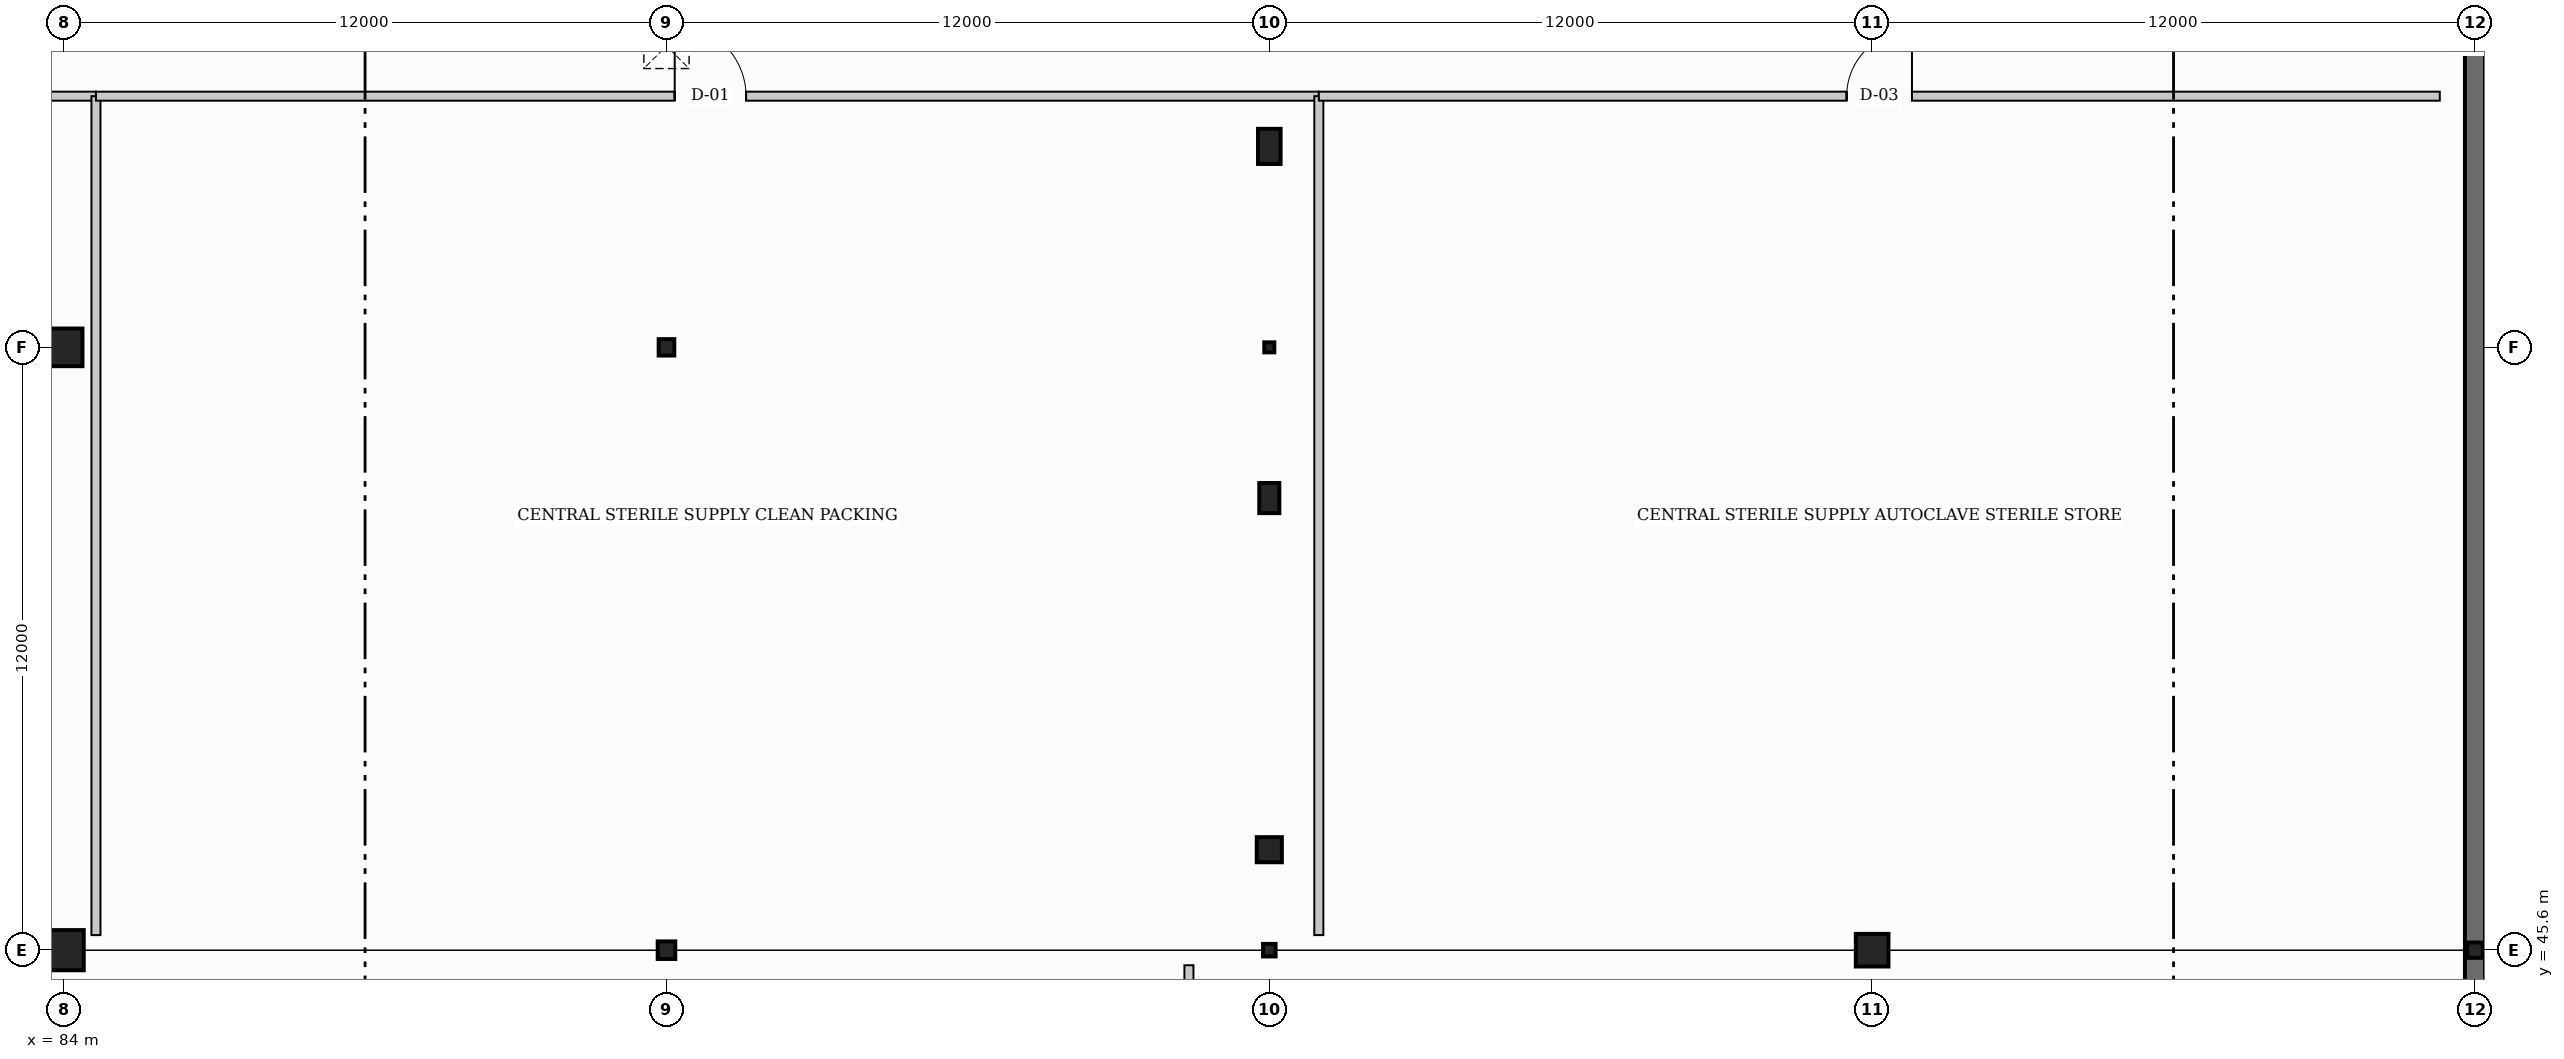
"""IFC4 building model, lengths in metres.
Left out: names, types, materials, properties, quantities, classifications, styles, units other than length and angle.
Written with IfcOpenShell. Run it as: python <this file> out.ifc"""

import sys

from ifc_helpers import new_model, si_unit, direction, frame, frame_2d, origin, origin_2d, place, context, subcontext, project, spatial, rectangle, hollow_rectangle, i_section, extrude, element, fill, save


model = new_model("IFC4")
c1 = context("Model", 3, precision=1e-05, world=origin(), true_north=direction((0.0, 1.0)))
c2 = subcontext(c1, "Body", "Model", "MODEL_VIEW")
j1 = project(units=[si_unit("LENGTHUNIT", "METRE"), si_unit("PLANEANGLEUNIT", "RADIAN")], contexts=[c1])
p1 = place(None, origin())
s1 = spatial("IfcSite", under=j1, at=p1, CompositionType="ELEMENT")
p2 = place(p1, origin())
s2 = spatial("IfcBuilding", under=s1, at=p2, CompositionType="ELEMENT")
p3 = place(p2, frame((0.0, 0.0, -4.8)))
s3 = spatial("IfcBuildingStorey", under=s2, at=p3, CompositionType="ELEMENT", Elevation=-4.8)
p4 = place(p3, frame((132.0, 45.6, 0.0), z_axis=(0.0, 0.0, 1.0), x_axis=(0.0, 1.0, 0.0)))
e1 = element("IfcWall", 1, at=p4, inside=s3, PredefinedType="USERDEFINED", context=c2, shape_type="SweptSolid", body=[
    extrude(rectangle(XDim=36.0, YDim=0.4, at=frame_2d((18.0, 0.0))), origin(), (0.0, 0.0, 1.0), 4.8),
])
p5 = place(p3, frame((132.0, 0.0, 0.0), z_axis=(0.0, 0.0, 1.0), x_axis=(0.0, 1.0, 0.0)))
e2 = element("IfcWall", 2, at=p5, inside=s3, PredefinedType="USERDEFINED", context=c2, shape_type="SweptSolid", body=[
    extrude(rectangle(XDim=45.6, YDim=0.4, at=frame_2d((22.8, 0.0))), origin(), (0.0, 0.0, 1.0), 4.8),
])
p6 = place(p3, frame((84.0, 45.6, 0.0), z_axis=(0.0, 0.0, 1.0), x_axis=(0.0, 1.0, 0.0)))
e3 = element("IfcColumn", 3, at=p6, inside=s3, PredefinedType="COLUMN", context=c2, shape_type="SweptSolid", body=[
    extrude(rectangle(XDim=0.8, YDim=0.8, at=origin_2d()), origin(), (0.0, 0.0, 1.0), 4.8),
])
p7 = place(p3, frame((84.0, 57.6, 0.0), z_axis=(0.0, 0.0, 1.0), x_axis=(0.0, 1.0, 0.0)))
e4 = element("IfcColumn", 4, at=p7, inside=s3, PredefinedType="COLUMN", context=c2, shape_type="SweptSolid", body=[
    extrude(rectangle(XDim=0.75, YDim=0.75, at=origin_2d()), origin(), (0.0, 0.0, 1.0), 4.8),
])
p8 = place(p3, frame((96.0, 45.6, 0.0), z_axis=(0.0, 0.0, 1.0), x_axis=(1.0, 0.0, 0.0)))
e5 = element("IfcColumn", 5, at=p8, inside=s3, PredefinedType="COLUMN", context=c2, shape_type="SweptSolid", body=[
    extrude(i_section(OverallWidth=0.35, OverallDepth=0.35, WebThickness=0.014, FlangeThickness=0.024, at=origin_2d()), origin(), (0.0, 0.0, 1.0), 4.8),
])
p9 = place(p3, frame((96.0, 57.6, 0.0), z_axis=(0.0, 0.0, 1.0), x_axis=(1.0, 0.0, 0.0)))
e6 = element("IfcColumn", 6, at=p9, inside=s3, PredefinedType="COLUMN", context=c2, shape_type="SweptSolid", body=[
    extrude(i_section(OverallWidth=0.311, OverallDepth=0.327, WebThickness=0.016, FlangeThickness=0.025, at=origin_2d()), origin(), (0.0, 0.0, 1.0), 4.8),
])
p10 = place(p3, frame((108.0, 45.6, 0.0), z_axis=(0.0, 0.0, 1.0), x_axis=(0.0, 1.0, 0.0)))
e7 = element("IfcColumn", 7, at=p10, inside=s3, PredefinedType="COLUMN", context=c2, shape_type="SweptSolid", body=[
    extrude(hollow_rectangle(XDim=0.25, YDim=0.25, WallThickness=0.012, at=origin_2d()), origin(), (0.0, 0.0, 1.0), 4.8),
])
p11 = place(p3, frame((108.0, 57.6, 0.0), z_axis=(0.0, 0.0, 1.0), x_axis=(0.0, 1.0, 0.0)))
e8 = element("IfcColumn", 8, at=p11, inside=s3, PredefinedType="COLUMN", context=c2, shape_type="SweptSolid", body=[
    extrude(hollow_rectangle(XDim=0.2, YDim=0.2, WallThickness=0.01, at=origin_2d()), origin(), (0.0, 0.0, 1.0), 4.8),
])
p12 = place(p3, frame((120.0, 45.6, 0.0), z_axis=(0.0, 0.0, 1.0), x_axis=(1.0, 0.0, 0.0)))
e9 = element("IfcColumn", 9, at=p12, inside=s3, PredefinedType="COLUMN", context=c2, shape_type="SweptSolid", body=[
    extrude(rectangle(XDim=0.65, YDim=0.65, at=origin_2d()), origin(), (0.0, 0.0, 1.0), 4.8),
])
p13 = place(p3, frame((132.0, 45.6, 0.0), z_axis=(0.0, 0.0, 1.0), x_axis=(0.0, 1.0, 0.0)))
e10 = element("IfcColumn", 10, at=p13, inside=s3, PredefinedType="COLUMN", context=c2, shape_type="SweptSolid", body=[
    extrude(i_section(OverallWidth=0.305, OverallDepth=0.308, WebThickness=0.01, FlangeThickness=0.015, at=origin_2d()), origin(), (0.0, 0.0, 1.0), 4.8),
])
p14 = place(p3, frame((108.0, 47.6, 0.0), z_axis=(0.0, 0.0, 1.0), x_axis=(1.0, 0.0, 0.0)))
e11 = element("IfcColumn", 11, at=p14, inside=s3, PredefinedType="COLUMN", context=c2, shape_type="SweptSolid", body=[
    extrude(rectangle(XDim=0.5, YDim=0.5, at=origin_2d()), origin(), (0.0, 0.0, 1.0), 4.8),
])
p15 = place(p3, frame((108.0, 54.6, 0.0), z_axis=(0.0, 0.0, 1.0), x_axis=(1.0, 0.0, 0.0)))
e12 = element("IfcColumn", 12, at=p15, inside=s3, PredefinedType="PILASTER", context=c2, shape_type="SweptSolid", body=[
    extrude(rectangle(XDim=0.4, YDim=0.6, at=origin_2d()), origin(), (0.0, 0.0, 1.0), 4.8),
])
p16 = place(p3, frame((108.0, 61.6, 0.0), z_axis=(0.0, 0.0, 1.0), x_axis=(1.0, 0.0, 0.0)))
e13 = element("IfcColumn", 13, at=p16, inside=s3, PredefinedType="PILASTER", context=c2, shape_type="SweptSolid", body=[
    extrude(rectangle(XDim=0.45, YDim=0.7, at=origin_2d()), origin(), (0.0, 0.0, 1.0), 4.8),
])
p17 = place(p3, frame((60.3, 62.6, 0.0), z_axis=(0.0, 0.0, 1.0), x_axis=(1.0, 0.0, 0.0)))
e14 = element("IfcWall", 14, at=p17, inside=s3, PredefinedType="PARTITIONING", context=c2, shape_type="SweptSolid", body=[
    extrude(rectangle(XDim=24.343, YDim=0.18, at=frame_2d((12.171, 0.0))), origin(), (0.0, 0.0, 1.0), 3.515),
])
p18 = place(p17, frame((11.521, 0.0, 0.0)))
e15 = element("IfcOpeningElement", 15, at=p18, cuts=e14, PredefinedType="OPENING", context=c2, shape_type="SweptSolid", body=[
    extrude(rectangle(XDim=1.9, YDim=2.25, at=frame_2d((0.95, 1.125))), frame((0.0, 0.1, 0.0), z_axis=(0.0, -1.0, 0.0), x_axis=(1.0, 0.0, 0.0)), (0.0, 0.0, 1.0), 0.2),
])
p19 = place(p3, frame((84.643, 45.9, 0.0), z_axis=(0.0, 0.0, 1.0), x_axis=(0.0, 1.0, 0.0)))
e16 = element("IfcWall", 16, at=p19, inside=s3, PredefinedType="PARTITIONING", context=c2, shape_type="SweptSolid", body=[
    extrude(rectangle(XDim=16.7, YDim=0.18, at=frame_2d((8.35, 0.0))), origin(), (0.0, 0.0, 1.0), 3.515),
])
p20 = place(p3, frame((84.643, 62.6, 0.0), z_axis=(0.0, 0.0, 1.0), x_axis=(1.0, 0.0, 0.0)))
e17 = element("IfcWall", 17, at=p20, inside=s3, PredefinedType="PARTITIONING", context=c2, shape_type="SweptSolid", body=[
    extrude(rectangle(XDim=24.343, YDim=0.18, at=frame_2d((12.171, 0.0))), origin(), (0.0, 0.0, 1.0), 3.803),
])
p21 = place(p20, frame((11.521, 0.0, 0.0)))
e18 = element("IfcOpeningElement", 18, at=p21, cuts=e17, PredefinedType="OPENING", context=c2, shape_type="SweptSolid", body=[
    extrude(rectangle(XDim=1.42, YDim=2.22, at=frame_2d((0.71, 1.11))), frame((0.0, 0.1, 0.0), z_axis=(0.0, -1.0, 0.0), x_axis=(1.0, 0.0, 0.0)), (0.0, 0.0, 1.0), 0.2),
])
p22 = place(p3, frame((108.986, 45.9, 0.0), z_axis=(0.0, 0.0, 1.0), x_axis=(0.0, 1.0, 0.0)))
e19 = element("IfcWall", 19, at=p22, inside=s3, PredefinedType="PARTITIONING", context=c2, shape_type="SweptSolid", body=[
    extrude(rectangle(XDim=16.7, YDim=0.18, at=frame_2d((8.35, 0.0))), origin(), (0.0, 0.0, 1.0), 3.765),
])
p23 = place(p3, frame((108.986, 62.6, 0.0), z_axis=(0.0, 0.0, 1.0), x_axis=(1.0, 0.0, 0.0)))
e20 = element("IfcWall", 20, at=p23, inside=s3, PredefinedType="PARTITIONING", context=c2, shape_type="SweptSolid", body=[
    extrude(rectangle(XDim=22.314, YDim=0.18, at=frame_2d((11.157, 0.0))), origin(), (0.0, 0.0, 1.0), 4.43),
])
p24 = place(p23, frame((10.507, 0.0, 0.0)))
e21 = element("IfcOpeningElement", 21, at=p24, cuts=e20, PredefinedType="OPENING", context=c2, shape_type="SweptSolid", body=[
    extrude(rectangle(XDim=1.3, YDim=2.16, at=frame_2d((0.65, 1.08))), frame((0.0, 0.1, 0.0), z_axis=(0.0, -1.0, 0.0), x_axis=(1.0, 0.0, 0.0)), (0.0, 0.0, 1.0), 0.2),
])
p25 = place(p3, frame((106.4, 23.2, 0.0), z_axis=(0.0, 0.0, 1.0), x_axis=(0.0, 1.0, 0.0)))
e22 = element("IfcWall", 22, at=p25, inside=s3, PredefinedType="PARTITIONING", context=c2, shape_type="SweptSolid", body=[
    extrude(rectangle(XDim=22.1, YDim=0.18, at=frame_2d((11.05, 0.0))), origin(), (0.0, 0.0, 1.0), 3.515),
])
p26 = place(p21, origin())
e23 = element("IfcDoor", 23, at=p26, inside=s3, OperationType="SINGLE_SWING_LEFT", PredefinedType="DOOR", context=c2, shape_type="SweptSolid", body=[
    extrude(rectangle(XDim=1.42, YDim=2.22, at=frame_2d((0.71, 1.11))), frame((0.0, 0.025, 0.0), z_axis=(0.0, -1.0, 0.0), x_axis=(1.0, 0.0, 0.0)), (0.0, 0.0, 1.0), 0.05),
])
fill(e18, e23)
p27 = place(p24, origin())
e24 = element("IfcDoor", 24, at=p27, inside=s3, OperationType="SINGLE_SWING_RIGHT", PredefinedType="DOOR", context=c2, shape_type="SweptSolid", body=[
    extrude(rectangle(XDim=1.3, YDim=2.16, at=frame_2d((0.65, 1.08))), frame((0.0, 0.025, 0.0), z_axis=(0.0, -1.0, 0.0), x_axis=(1.0, 0.0, 0.0)), (0.0, 0.0, 1.0), 0.05),
])
fill(e21, e24)
save(model, sys.argv[1])
